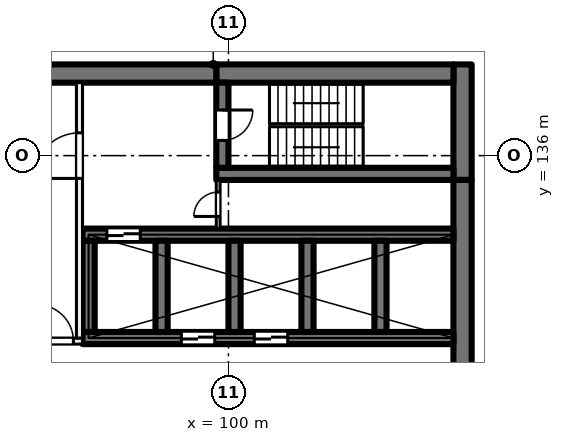
"""IFC4 building model, lengths in metres.
Left out: names, types, materials, properties, quantities, classifications, styles, units other than length and angle.
Written with IfcOpenShell. Run it as: python <this file> out.ifc"""

import sys

from ifc_helpers import new_model, si_unit, direction, frame, frame_2d, origin, place, context, subcontext, project, spatial, rectangle, extrude, element, fill, save


model = new_model("IFC4")
c1 = context("Model", 3, precision=1e-05, world=origin(), true_north=direction((0.0, 1.0)))
c2 = subcontext(c1, "Body", "Model", "MODEL_VIEW")
j1 = project(units=[si_unit("LENGTHUNIT", "METRE"), si_unit("PLANEANGLEUNIT", "RADIAN")], contexts=[c1])
p1 = place(None, origin())
s1 = spatial("IfcSite", under=j1, at=p1, CompositionType="ELEMENT")
p2 = place(p1, origin())
s2 = spatial("IfcBuilding", under=s1, at=p2, CompositionType="ELEMENT")
p3 = place(p2, frame((0.0, 0.0, 51.5)))
s3 = spatial("IfcBuildingStorey", under=s2, at=p3, CompositionType="ELEMENT", Elevation=51.5)
p4 = place(p3, frame((107.7, 139.0, 0.0), z_axis=(0.0, 0.0, 1.0), x_axis=(0.0, -1.0, 0.0)))
e1 = element("IfcWall", 1, at=p4, inside=s3, PredefinedType="SHEAR", context=c2, shape_type="SweptSolid", body=[
    extrude(rectangle(XDim=3.8, YDim=0.6, at=frame_2d((1.9, 0.0))), origin(), (0.0, 0.0, 1.0), 4.0),
])
p5 = place(p3, frame((107.7, 135.2, 0.0), z_axis=(0.0, 0.0, 1.0), x_axis=(0.0, -1.0, 0.0)))
e2 = element("IfcWall", 2, at=p5, inside=s3, PredefinedType="SHEAR", context=c2, shape_type="SweptSolid", body=[
    extrude(rectangle(XDim=14.4, YDim=0.6, at=frame_2d((7.2, 0.0))), origin(), (0.0, 0.0, 1.0), 4.0),
])
p6 = place(p3, frame((107.4, 138.7, 0.0), z_axis=(0.0, 0.0, 1.0), x_axis=(-1.0, 0.0, 0.0)))
e3 = element("IfcWall", 3, at=p6, inside=s3, PredefinedType="SHEAR", context=c2, shape_type="SweptSolid", body=[
    extrude(rectangle(XDim=7.8, YDim=0.6, at=frame_2d((3.9, 0.0))), origin(), (0.0, 0.0, 1.0), 4.0),
])
p7 = place(p3, frame((99.6, 138.7, 0.0), z_axis=(0.0, 0.0, 1.0), x_axis=(-1.0, 0.0, 0.0)))
e4 = element("IfcWall", 4, at=p7, inside=s3, PredefinedType="SHEAR", context=c2, shape_type="SweptSolid", body=[
    extrude(rectangle(XDim=8.9, YDim=0.6, at=frame_2d((4.45, 0.0))), origin(), (0.0, 0.0, 1.0), 4.0),
])
p8 = place(p3, frame((107.4, 135.4, 0.0), z_axis=(0.0, 0.0, 1.0), x_axis=(-1.0, 0.0, 0.0)))
e5 = element("IfcWall", 5, at=p8, inside=s3, PredefinedType="SHEAR", context=c2, shape_type="SweptSolid", body=[
    extrude(rectangle(XDim=7.8, YDim=0.4, at=frame_2d((3.9, 0.0))), origin(), (0.0, 0.0, 1.0), 4.0),
])
p9 = place(p3, frame((99.8, 138.4, 0.0), z_axis=(0.0, 0.0, 1.0), x_axis=(0.0, -1.0, 0.0)))
e6 = element("IfcWall", 6, at=p9, inside=s3, PredefinedType="SHEAR", context=c2, shape_type="SweptSolid", body=[
    extrude(rectangle(XDim=2.8, YDim=0.4, at=frame_2d((1.4, 0.0))), origin(), (0.0, 0.0, 1.0), 4.0),
])
p10 = place(p9, frame((0.9, 0.0, 0.0)))
e7 = element("IfcOpeningElement", 7, at=p10, cuts=e6, PredefinedType="OPENING", context=c2, shape_type="SweptSolid", body=[
    extrude(rectangle(XDim=1.0, YDim=2.1, at=frame_2d((0.5, 1.05))), frame((0.0, 0.21, 0.0), z_axis=(0.0, -1.0, 0.0), x_axis=(1.0, 0.0, 0.0)), (0.0, 0.0, 1.0), 0.42),
])
p11 = place(p3, frame((107.4, 130.0, 0.0), z_axis=(0.0, 0.0, 1.0), x_axis=(-1.0, 0.0, 0.0)))
e8 = element("IfcWall", 8, at=p11, inside=s3, PredefinedType="SHEAR", context=c2, shape_type="SweptSolid", body=[
    extrude(rectangle(XDim=12.2, YDim=0.4, at=frame_2d((6.1, 0.0))), origin(), (0.0, 0.0, 1.0), 4.0),
])
p12 = place(p11, frame((5.45, 0.0, 0.0)))
e9 = element("IfcOpeningElement", 9, at=p12, cuts=e8, PredefinedType="OPENING", context=c2, shape_type="SweptSolid", body=[
    extrude(rectangle(XDim=1.1, YDim=2.1, at=frame_2d((0.55, 1.05))), frame((0.0, 0.21, 0.0), z_axis=(0.0, -1.0, 0.0), x_axis=(1.0, 0.0, 0.0)), (0.0, 0.0, 1.0), 0.42),
])
p13 = place(p11, frame((7.85, 0.0, 0.0)))
e10 = element("IfcOpeningElement", 10, at=p13, cuts=e8, PredefinedType="OPENING", context=c2, shape_type="SweptSolid", body=[
    extrude(rectangle(XDim=1.1, YDim=2.1, at=frame_2d((0.55, 1.05))), frame((0.0, 0.21, 0.0), z_axis=(0.0, -1.0, 0.0), x_axis=(1.0, 0.0, 0.0)), (0.0, 0.0, 1.0), 0.42),
])
p14 = place(p3, frame((107.4, 133.4, 0.0), z_axis=(0.0, 0.0, 1.0), x_axis=(-1.0, 0.0, 0.0)))
e11 = element("IfcWall", 11, at=p14, inside=s3, PredefinedType="SHEAR", context=c2, shape_type="SweptSolid", body=[
    extrude(rectangle(XDim=12.2, YDim=0.4, at=frame_2d((6.1, 0.0))), origin(), (0.0, 0.0, 1.0), 4.0),
])
p15 = place(p14, frame((10.3, 0.0, 0.0)))
e12 = element("IfcOpeningElement", 12, at=p15, cuts=e11, PredefinedType="OPENING", context=c2, shape_type="SweptSolid", body=[
    extrude(rectangle(XDim=1.1, YDim=2.1, at=frame_2d((0.55, 1.05))), frame((0.0, 0.21, 0.0), z_axis=(0.0, -1.0, 0.0), x_axis=(1.0, 0.0, 0.0)), (0.0, 0.0, 1.0), 0.42),
])
for number, where, z_axis, x_axis in (
    (13, (105.0, 133.2, 0.0), (0.0, 0.0, 1.0), (0.0, -1.0, 0.0)),
    (14, (102.6, 133.2, 0.0), (0.0, 0.0, 1.0), (0.0, -1.0, 0.0)),
    (15, (100.2, 133.2, 0.0), (0.0, 0.0, 1.0), (0.0, -1.0, 0.0)),
    (16, (97.8, 133.2, 0.0), (0.0, 0.0, 1.0), (0.0, -1.0, 0.0)),
    (17, (95.4, 133.2, 0.0), (0.0, 0.0, 1.0), (0.0, -1.0, 0.0)),
):
    element("IfcWall", number, at=place(p3, frame(where, z_axis=z_axis, x_axis=x_axis)), inside=s3, PredefinedType="SHEAR", context=c2, shape_type="SweptSolid", body=[
        extrude(rectangle(XDim=3.0, YDim=0.4, at=frame_2d((1.5, 0.0))), origin(), (0.0, 0.0, 1.0), 4.0),
    ])
p16 = place(p3, frame((91.4, 129.9, 0.0), z_axis=(0.0, 0.0, 1.0), x_axis=(1.0, 0.0, 0.0)))
e18 = element("IfcWall", 18, at=p16, inside=s3, PredefinedType="PARTITIONING", context=c2, shape_type="SweptSolid", body=[
    extrude(rectangle(XDim=3.8, YDim=0.2, at=frame_2d((1.9, 0.0))), origin(), (0.0, 0.0, 1.0), 3.625),
])
p17 = place(p16, frame((2.3, 0.0, 0.0)))
e19 = element("IfcOpeningElement", 19, at=p17, cuts=e18, PredefinedType="OPENING", context=c2, shape_type="SweptSolid", body=[
    extrude(rectangle(XDim=1.2, YDim=2.1, at=frame_2d((0.6, 1.05))), frame((0.0, 0.11, 0.0), z_axis=(0.0, -1.0, 0.0), x_axis=(1.0, 0.0, 0.0)), (0.0, 0.0, 1.0), 0.22),
])
p18 = place(p3, frame((95.1, 130.0, 0.0), z_axis=(0.0, 0.0, 1.0), x_axis=(0.0, 1.0, 0.0)))
e20 = element("IfcWall", 20, at=p18, inside=s3, PredefinedType="PARTITIONING", context=c2, shape_type="SweptSolid", body=[
    extrude(rectangle(XDim=8.4, YDim=0.2, at=frame_2d((4.2, 0.0))), origin(), (0.0, 0.0, 1.0), 3.625),
])
p19 = place(p18, frame((5.25, 0.0, 0.0)))
e21 = element("IfcOpeningElement", 21, at=p19, cuts=e20, PredefinedType="OPENING", context=c2, shape_type="SweptSolid", body=[
    extrude(rectangle(XDim=1.5, YDim=2.1, at=frame_2d((0.75, 1.05))), frame((0.0, 0.11, 0.0), z_axis=(0.0, -1.0, 0.0), x_axis=(1.0, 0.0, 0.0)), (0.0, 0.0, 1.0), 0.22),
])
p20 = place(p3, frame((99.663, 133.6, 0.0), z_axis=(0.0, 0.0, 1.0), x_axis=(0.0, 1.0, 0.0)))
e22 = element("IfcWall", 22, at=p20, inside=s3, PredefinedType="PARTITIONING", context=c2, shape_type="SweptSolid", body=[
    extrude(rectangle(XDim=1.6, YDim=0.125, at=frame_2d((0.8, 0.0))), origin(), (0.0, 0.0, 1.0), 3.625),
])
p21 = place(p20, frame((0.4, 0.0, 0.0)))
e23 = element("IfcOpeningElement", 23, at=p21, cuts=e22, PredefinedType="OPENING", context=c2, shape_type="SweptSolid", body=[
    extrude(rectangle(XDim=0.8, YDim=2.1, at=frame_2d((0.4, 1.05))), frame((0.0, 0.073, 0.0), z_axis=(0.0, -1.0, 0.0), x_axis=(1.0, 0.0, 0.0)), (0.0, 0.0, 1.0), 0.145),
])
p22 = place(p12, origin())
e24 = element("IfcDoor", 24, at=p22, inside=s3, OperationType="DOUBLE_DOOR_SLIDING", PredefinedType="DOOR", context=c2, shape_type="SweptSolid", body=[
    extrude(rectangle(XDim=1.1, YDim=2.1, at=frame_2d((0.55, 1.05))), frame((0.0, 0.025, 0.0), z_axis=(0.0, -1.0, 0.0), x_axis=(1.0, 0.0, 0.0)), (0.0, 0.0, 1.0), 0.05),
])
fill(e9, e24)
p23 = place(p13, origin())
e25 = element("IfcDoor", 25, at=p23, inside=s3, OperationType="DOUBLE_DOOR_SLIDING", PredefinedType="DOOR", context=c2, shape_type="SweptSolid", body=[
    extrude(rectangle(XDim=1.1, YDim=2.1, at=frame_2d((0.55, 1.05))), frame((0.0, 0.025, 0.0), z_axis=(0.0, -1.0, 0.0), x_axis=(1.0, 0.0, 0.0)), (0.0, 0.0, 1.0), 0.05),
])
fill(e10, e25)
p24 = place(p17, origin())
e26 = element("IfcDoor", 26, at=p24, inside=s3, OperationType="DOUBLE_DOOR_SINGLE_SWING", PredefinedType="DOOR", context=c2, shape_type="SweptSolid", body=[
    extrude(rectangle(XDim=1.2, YDim=2.1, at=frame_2d((0.6, 1.05))), frame((0.0, 0.025, 0.0), z_axis=(0.0, -1.0, 0.0), x_axis=(1.0, 0.0, 0.0)), (0.0, 0.0, 1.0), 0.05),
])
fill(e19, e26)
p25 = place(p19, origin())
e27 = element("IfcDoor", 27, at=p25, inside=s3, OperationType="DOUBLE_DOOR_SINGLE_SWING", PredefinedType="DOOR", context=c2, shape_type="SweptSolid", body=[
    extrude(rectangle(XDim=1.5, YDim=2.1, at=frame_2d((0.75, 1.05))), frame((0.0, 0.025, 0.0), z_axis=(0.0, -1.0, 0.0), x_axis=(1.0, 0.0, 0.0)), (0.0, 0.0, 1.0), 0.05),
])
fill(e21, e27)
p26 = place(p10, origin())
e28 = element("IfcDoor", 28, at=p26, inside=s3, OperationType="SINGLE_SWING_RIGHT", PredefinedType="DOOR", context=c2, shape_type="SweptSolid", body=[
    extrude(rectangle(XDim=1.0, YDim=2.1, at=frame_2d((0.5, 1.05))), frame((0.0, 0.025, 0.0), z_axis=(0.0, -1.0, 0.0), x_axis=(1.0, 0.0, 0.0)), (0.0, 0.0, 1.0), 0.05),
])
fill(e7, e28)
p27 = place(p21, origin())
e29 = element("IfcDoor", 29, at=p27, inside=s3, OperationType="SINGLE_SWING_LEFT", PredefinedType="DOOR", context=c2, shape_type="SweptSolid", body=[
    extrude(rectangle(XDim=0.8, YDim=2.1, at=frame_2d((0.4, 1.05))), frame((0.0, 0.025, 0.0), z_axis=(0.0, -1.0, 0.0), x_axis=(1.0, 0.0, 0.0)), (0.0, 0.0, 1.0), 0.05),
])
fill(e23, e29)
p28 = place(p15, origin())
e30 = element("IfcDoor", 30, at=p28, inside=s3, OperationType="DOUBLE_DOOR_SLIDING", PredefinedType="DOOR", context=c2, shape_type="SweptSolid", body=[
    extrude(rectangle(XDim=1.1, YDim=2.1, at=frame_2d((0.55, 1.05))), frame((0.0, 0.025, 0.0), z_axis=(0.0, -1.0, 0.0), x_axis=(1.0, 0.0, 0.0)), (0.0, 0.0, 1.0), 0.05),
])
fill(e12, e30)
save(model, sys.argv[1])
